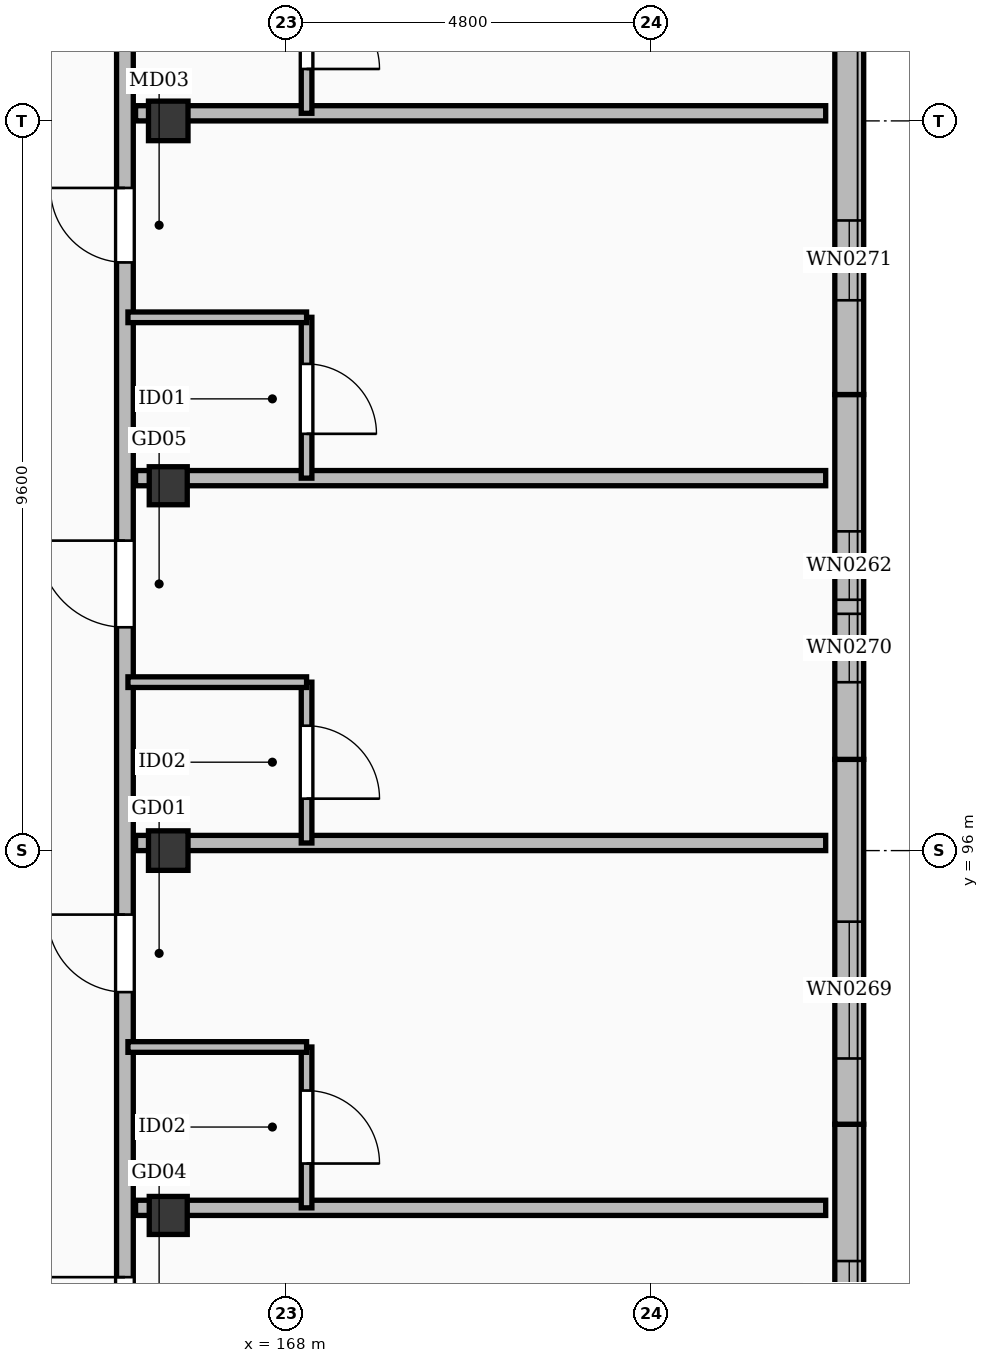
"""IFC4 building model, lengths in metres.
Left out: names, types, materials, properties, quantities, classifications, styles, units other than length and angle.
Written with IfcOpenShell. Run it as: python <this file> out.ifc"""

import sys

from ifc_helpers import new_model, si_unit, direction, frame, frame_2d, origin, origin_2d, place, context, subcontext, project, spatial, rectangle, extrude, element, fill, save


model = new_model("IFC4")
c1 = context("Model", 3, precision=1e-05, world=origin(), true_north=direction((0.0, 1.0)))
c2 = subcontext(c1, "Body", "Model", "MODEL_VIEW")
j1 = project(units=[si_unit("LENGTHUNIT", "METRE"), si_unit("PLANEANGLEUNIT", "RADIAN")], contexts=[c1])
p1 = place(None, origin())
s1 = spatial("IfcSite", under=j1, at=p1, CompositionType="ELEMENT")
p2 = place(p1, origin())
s2 = spatial("IfcBuilding", under=s1, at=p2, CompositionType="ELEMENT")
p3 = place(p2, frame((0.0, 0.0, 50.4)))
s3 = spatial("IfcBuildingStorey", under=s2, at=p3, CompositionType="ELEMENT", Elevation=50.4)
for number, where, z_axis, x_axis in (
    (1, (166.45, 96.0, 0.0), (0.0, 0.0, 1.0), (1.0, 0.0, 0.0)),
    (2, (166.45, 105.6, 0.0), (0.0, 0.0, 1.0), (1.0, 0.0, 0.0)),
):
    element("IfcColumn", number, at=place(p3, frame(where, z_axis=z_axis, x_axis=x_axis)), inside=s3, PredefinedType="COLUMN", context=c2, shape_type="SweptSolid", body=[
        extrude(rectangle(XDim=0.52, YDim=0.52, at=origin_2d()), origin(), (0.0, 0.0, 1.0), 4.2),
    ])
for number, where, z_axis, x_axis in (
    (3, (166.45, 91.2, 0.0), (0.0, 0.0, 1.0), (1.0, 0.0, 0.0)),
    (4, (166.45, 100.8, 0.0), (0.0, 0.0, 1.0), (1.0, 0.0, 0.0)),
):
    element("IfcColumn", number, at=place(p3, frame(where, z_axis=z_axis, x_axis=x_axis)), inside=s3, PredefinedType="COLUMN", context=c2, shape_type="SweptSolid", body=[
        extrude(rectangle(XDim=0.5, YDim=0.5, at=origin_2d()), origin(), (0.0, 0.0, 1.0), 4.2),
    ])
p4 = place(p3, frame((175.41, 92.4, 0.0), z_axis=(0.0, 0.0, 1.0), x_axis=(0.0, -1.0, 0.0)))
e5 = element("IfcWall", 5, at=p4, inside=s3, PredefinedType="SOLIDWALL", context=c2, shape_type="SweptSolid", body=[
    extrude(rectangle(XDim=4.8, YDim=0.38, at=frame_2d((2.4, 0.0))), origin(), (0.0, 0.0, 1.0), 3.96),
])
p5 = place(p4, frame((1.8, 0.0, 0.35)))
e6 = element("IfcOpeningElement", 6, at=p5, cuts=e5, PredefinedType="OPENING", context=c2, shape_type="SweptSolid", body=[
    extrude(rectangle(XDim=0.9, YDim=1.68, at=frame_2d((0.45, 0.84))), frame((0.0, 0.202, 0.0), z_axis=(0.0, -1.0, 0.0), x_axis=(1.0, 0.0, 0.0)), (0.0, 0.0, 1.0), 0.404),
])
p6 = place(p4, frame((3.135, 0.0, 0.55)))
e7 = element("IfcOpeningElement", 7, at=p6, cuts=e5, PredefinedType="OPENING", context=c2, shape_type="SweptSolid", body=[
    extrude(rectangle(XDim=1.2, YDim=1.72, at=frame_2d((0.6, 0.86))), frame((0.0, 0.202, 0.0), z_axis=(0.0, -1.0, 0.0), x_axis=(1.0, 0.0, 0.0)), (0.0, 0.0, 1.0), 0.404),
])
p7 = place(p3, frame((175.41, 97.2, 0.0), z_axis=(0.0, 0.0, 1.0), x_axis=(0.0, -1.0, 0.0)))
e8 = element("IfcWall", 8, at=p7, inside=s3, PredefinedType="SOLIDWALL", context=c2, shape_type="SweptSolid", body=[
    extrude(rectangle(XDim=4.8, YDim=0.38, at=frame_2d((2.4, 0.0))), origin(), (0.0, 0.0, 1.0), 3.96),
])
p8 = place(p7, frame((2.135, 0.0, 0.55)))
e9 = element("IfcOpeningElement", 9, at=p8, cuts=e8, PredefinedType="OPENING", context=c2, shape_type="SweptSolid", body=[
    extrude(rectangle(XDim=1.8, YDim=1.76, at=frame_2d((0.9, 0.88))), frame((0.0, 0.202, 0.0), z_axis=(0.0, -1.0, 0.0), x_axis=(1.0, 0.0, 0.0)), (0.0, 0.0, 1.0), 0.404),
])
p9 = place(p3, frame((175.41, 102.0, 0.0), z_axis=(0.0, 0.0, 1.0), x_axis=(0.0, -1.0, 0.0)))
e10 = element("IfcWall", 10, at=p9, inside=s3, PredefinedType="SOLIDWALL", context=c2, shape_type="SweptSolid", body=[
    extrude(rectangle(XDim=4.8, YDim=0.38, at=frame_2d((2.4, 0.0))), origin(), (0.0, 0.0, 1.0), 3.96),
])
p10 = place(p9, frame((1.8, 0.0, 0.35)))
e11 = element("IfcOpeningElement", 11, at=p10, cuts=e10, PredefinedType="OPENING", context=c2, shape_type="SweptSolid", body=[
    extrude(rectangle(XDim=0.9, YDim=1.68, at=frame_2d((0.45, 0.84))), frame((0.0, 0.202, 0.0), z_axis=(0.0, -1.0, 0.0), x_axis=(1.0, 0.0, 0.0)), (0.0, 0.0, 1.0), 0.404),
])
p11 = place(p9, frame((2.885, 0.0, 0.5)))
e12 = element("IfcOpeningElement", 12, at=p11, cuts=e10, PredefinedType="OPENING", context=c2, shape_type="SweptSolid", body=[
    extrude(rectangle(XDim=0.9, YDim=1.68, at=frame_2d((0.45, 0.84))), frame((0.0, 0.202, 0.0), z_axis=(0.0, -1.0, 0.0), x_axis=(1.0, 0.0, 0.0)), (0.0, 0.0, 1.0), 0.404),
])
p12 = place(p3, frame((175.41, 106.8, 0.0), z_axis=(0.0, 0.0, 1.0), x_axis=(0.0, -1.0, 0.0)))
e13 = element("IfcWall", 13, at=p12, inside=s3, PredefinedType="SOLIDWALL", context=c2, shape_type="SweptSolid", body=[
    extrude(rectangle(XDim=4.8, YDim=0.38, at=frame_2d((2.4, 0.0))), origin(), (0.0, 0.0, 1.0), 3.96),
])
p13 = place(p12, frame((2.51, 0.0, 0.55)))
e14 = element("IfcOpeningElement", 14, at=p13, cuts=e13, PredefinedType="OPENING", context=c2, shape_type="SweptSolid", body=[
    extrude(rectangle(XDim=1.05, YDim=1.65, at=frame_2d((0.525, 0.825))), frame((0.0, 0.202, 0.0), z_axis=(0.0, -1.0, 0.0), x_axis=(1.0, 0.0, 0.0)), (0.0, 0.0, 1.0), 0.404),
])
p14 = place(p3, frame((165.88, 73.55, 0.0), z_axis=(0.0, 0.0, 1.0), x_axis=(0.0, 1.0, 0.0)))
e15 = element("IfcWall", 15, at=p14, inside=s3, PredefinedType="PARTITIONING", context=c2, shape_type="SweptSolid", body=[
    extrude(rectangle(XDim=52.1, YDim=0.22, at=frame_2d((26.05, 0.0))), origin(), (0.0, 0.0, 1.0), 3.202),
])
p15 = place(p14, frame((5.9, 0.0, 0.0)))
e16 = element("IfcOpeningElement", 16, at=p15, cuts=e15, PredefinedType="OPENING", context=c2, shape_type="SweptSolid", body=[
    extrude(rectangle(XDim=1.12, YDim=2.15, at=frame_2d((0.56, 1.075))), frame((0.0, 0.122, 0.0), z_axis=(0.0, -1.0, 0.0), x_axis=(1.0, 0.0, 0.0)), (0.0, 0.0, 1.0), 0.244),
])
p16 = place(p14, frame((15.788, 0.0, 0.0)))
e17 = element("IfcOpeningElement", 17, at=p16, cuts=e15, PredefinedType="OPENING", context=c2, shape_type="SweptSolid", body=[
    extrude(rectangle(XDim=1.05, YDim=2.22, at=frame_2d((0.525, 1.11))), frame((0.0, 0.122, 0.0), z_axis=(0.0, -1.0, 0.0), x_axis=(1.0, 0.0, 0.0)), (0.0, 0.0, 1.0), 0.244),
])
p17 = place(p14, frame((20.588, 0.0, 0.0)))
e18 = element("IfcOpeningElement", 18, at=p17, cuts=e15, PredefinedType="OPENING", context=c2, shape_type="SweptSolid", body=[
    extrude(rectangle(XDim=1.02, YDim=2.2, at=frame_2d((0.51, 1.1))), frame((0.0, 0.122, 0.0), z_axis=(0.0, -1.0, 0.0), x_axis=(1.0, 0.0, 0.0)), (0.0, 0.0, 1.0), 0.244),
])
p18 = place(p14, frame((25.388, 0.0, 0.0)))
e19 = element("IfcOpeningElement", 19, at=p18, cuts=e15, PredefinedType="OPENING", context=c2, shape_type="SweptSolid", body=[
    extrude(rectangle(XDim=1.14, YDim=2.26, at=frame_2d((0.57, 1.13))), frame((0.0, 0.122, 0.0), z_axis=(0.0, -1.0, 0.0), x_axis=(1.0, 0.0, 0.0)), (0.0, 0.0, 1.0), 0.244),
])
p19 = place(p14, frame((30.188, 0.0, 0.0)))
e20 = element("IfcOpeningElement", 20, at=p19, cuts=e15, PredefinedType="OPENING", context=c2, shape_type="SweptSolid", body=[
    extrude(rectangle(XDim=0.98, YDim=2.15, at=frame_2d((0.49, 1.075))), frame((0.0, 0.122, 0.0), z_axis=(0.0, -1.0, 0.0), x_axis=(1.0, 0.0, 0.0)), (0.0, 0.0, 1.0), 0.244),
])
p20 = place(p14, frame((34.988, 0.0, 0.0)))
e21 = element("IfcOpeningElement", 21, at=p20, cuts=e15, PredefinedType="OPENING", context=c2, shape_type="SweptSolid", body=[
    extrude(rectangle(XDim=1.28, YDim=2.16, at=frame_2d((0.64, 1.08))), frame((0.0, 0.122, 0.0), z_axis=(0.0, -1.0, 0.0), x_axis=(1.0, 0.0, 0.0)), (0.0, 0.0, 1.0), 0.244),
])
p21 = place(p14, frame((39.788, 0.0, 0.0)))
e22 = element("IfcOpeningElement", 22, at=p21, cuts=e15, PredefinedType="OPENING", context=c2, shape_type="SweptSolid", body=[
    extrude(rectangle(XDim=0.9, YDim=2.08, at=frame_2d((0.45, 1.04))), frame((0.0, 0.122, 0.0), z_axis=(0.0, -1.0, 0.0), x_axis=(1.0, 0.0, 0.0)), (0.0, 0.0, 1.0), 0.244),
])
p22 = place(p14, frame((44.588, 0.0, 0.0)))
e23 = element("IfcOpeningElement", 23, at=p22, cuts=e15, PredefinedType="OPENING", context=c2, shape_type="SweptSolid", body=[
    extrude(rectangle(XDim=1.05, YDim=2.22, at=frame_2d((0.525, 1.11))), frame((0.0, 0.122, 0.0), z_axis=(0.0, -1.0, 0.0), x_axis=(1.0, 0.0, 0.0)), (0.0, 0.0, 1.0), 0.244),
])
p23 = place(p14, frame((49.388, 0.0, 0.0)))
e24 = element("IfcOpeningElement", 24, at=p23, cuts=e15, PredefinedType="OPENING", context=c2, shape_type="SweptSolid", body=[
    extrude(rectangle(XDim=1.02, YDim=2.2, at=frame_2d((0.51, 1.1))), frame((0.0, 0.122, 0.0), z_axis=(0.0, -1.0, 0.0), x_axis=(1.0, 0.0, 0.0)), (0.0, 0.0, 1.0), 0.244),
])
p24 = place(p3, frame((166.02, 91.3, 0.0), z_axis=(0.0, 0.0, 1.0), x_axis=(1.0, 0.0, 0.0)))
e25 = element("IfcWall", 25, at=p24, inside=s3, PredefinedType="PARTITIONING", context=c2, shape_type="SweptSolid", body=[
    extrude(rectangle(XDim=9.08, YDim=0.2, at=frame_2d((4.54, 0.0))), origin(), (0.0, 0.0, 1.0), 3.352),
])
p25 = place(p3, frame((168.27, 91.3, 0.0), z_axis=(0.0, 0.0, 1.0), x_axis=(0.0, 1.0, 0.0)))
e26 = element("IfcWall", 26, at=p25, inside=s3, PredefinedType="PARTITIONING", context=c2, shape_type="SweptSolid", body=[
    extrude(rectangle(XDim=2.116, YDim=0.14, at=frame_2d((1.058, 0.0))), origin(), (0.0, 0.0, 1.0), 3.96),
])
p26 = place(p25, frame((0.583, 0.0, 0.0)))
e27 = element("IfcOpeningElement", 27, at=p26, cuts=e26, PredefinedType="OPENING", context=c2, shape_type="SweptSolid", body=[
    extrude(rectangle(XDim=0.96, YDim=2.12, at=frame_2d((0.48, 1.06))), frame((0.0, 0.082, 0.0), z_axis=(0.0, -1.0, 0.0), x_axis=(1.0, 0.0, 0.0)), (0.0, 0.0, 1.0), 0.164),
])
p27 = place(p3, frame((165.92, 93.416, 0.0), z_axis=(0.0, 0.0, 1.0), x_axis=(1.0, 0.0, 0.0)))
e28 = element("IfcWall", 28, at=p27, inside=s3, PredefinedType="PARTITIONING", context=c2, shape_type="SweptSolid", body=[
    extrude(rectangle(XDim=2.35, YDim=0.14, at=frame_2d((1.175, 0.0))), origin(), (0.0, 0.0, 1.0), 3.352),
])
p28 = place(p3, frame((166.02, 96.1, 0.0), z_axis=(0.0, 0.0, 1.0), x_axis=(1.0, 0.0, 0.0)))
e29 = element("IfcWall", 29, at=p28, inside=s3, PredefinedType="PARTITIONING", context=c2, shape_type="SweptSolid", body=[
    extrude(rectangle(XDim=9.08, YDim=0.2, at=frame_2d((4.54, 0.0))), origin(), (0.0, 0.0, 1.0), 3.352),
])
p29 = place(p3, frame((168.27, 96.1, 0.0), z_axis=(0.0, 0.0, 1.0), x_axis=(0.0, 1.0, 0.0)))
e30 = element("IfcWall", 30, at=p29, inside=s3, PredefinedType="PARTITIONING", context=c2, shape_type="SweptSolid", body=[
    extrude(rectangle(XDim=2.116, YDim=0.14, at=frame_2d((1.058, 0.0))), origin(), (0.0, 0.0, 1.0), 3.96),
])
p30 = place(p29, frame((0.583, 0.0, 0.0)))
e31 = element("IfcOpeningElement", 31, at=p30, cuts=e30, PredefinedType="OPENING", context=c2, shape_type="SweptSolid", body=[
    extrude(rectangle(XDim=0.96, YDim=2.12, at=frame_2d((0.48, 1.06))), frame((0.0, 0.082, 0.0), z_axis=(0.0, -1.0, 0.0), x_axis=(1.0, 0.0, 0.0)), (0.0, 0.0, 1.0), 0.164),
])
p31 = place(p3, frame((165.92, 98.216, 0.0), z_axis=(0.0, 0.0, 1.0), x_axis=(1.0, 0.0, 0.0)))
e32 = element("IfcWall", 32, at=p31, inside=s3, PredefinedType="PARTITIONING", context=c2, shape_type="SweptSolid", body=[
    extrude(rectangle(XDim=2.35, YDim=0.14, at=frame_2d((1.175, 0.0))), origin(), (0.0, 0.0, 1.0), 3.352),
])
p32 = place(p3, frame((166.02, 100.9, 0.0), z_axis=(0.0, 0.0, 1.0), x_axis=(1.0, 0.0, 0.0)))
e33 = element("IfcWall", 33, at=p32, inside=s3, PredefinedType="PARTITIONING", context=c2, shape_type="SweptSolid", body=[
    extrude(rectangle(XDim=9.08, YDim=0.2, at=frame_2d((4.54, 0.0))), origin(), (0.0, 0.0, 1.0), 3.352),
])
p33 = place(p3, frame((168.27, 100.9, 0.0), z_axis=(0.0, 0.0, 1.0), x_axis=(0.0, 1.0, 0.0)))
e34 = element("IfcWall", 34, at=p33, inside=s3, PredefinedType="PARTITIONING", context=c2, shape_type="SweptSolid", body=[
    extrude(rectangle(XDim=2.116, YDim=0.14, at=frame_2d((1.058, 0.0))), origin(), (0.0, 0.0, 1.0), 3.96),
])
p34 = place(p33, frame((0.583, 0.0, 0.0)))
e35 = element("IfcOpeningElement", 35, at=p34, cuts=e34, PredefinedType="OPENING", context=c2, shape_type="SweptSolid", body=[
    extrude(rectangle(XDim=0.92, YDim=2.1, at=frame_2d((0.46, 1.05))), frame((0.0, 0.082, 0.0), z_axis=(0.0, -1.0, 0.0), x_axis=(1.0, 0.0, 0.0)), (0.0, 0.0, 1.0), 0.164),
])
p35 = place(p3, frame((165.92, 103.016, 0.0), z_axis=(0.0, 0.0, 1.0), x_axis=(1.0, 0.0, 0.0)))
e36 = element("IfcWall", 36, at=p35, inside=s3, PredefinedType="PARTITIONING", context=c2, shape_type="SweptSolid", body=[
    extrude(rectangle(XDim=2.35, YDim=0.14, at=frame_2d((1.175, 0.0))), origin(), (0.0, 0.0, 1.0), 3.352),
])
p36 = place(p3, frame((166.02, 105.7, 0.0), z_axis=(0.0, 0.0, 1.0), x_axis=(1.0, 0.0, 0.0)))
e37 = element("IfcWall", 37, at=p36, inside=s3, PredefinedType="PARTITIONING", context=c2, shape_type="SweptSolid", body=[
    extrude(rectangle(XDim=9.08, YDim=0.2, at=frame_2d((4.54, 0.0))), origin(), (0.0, 0.0, 1.0), 3.352),
])
p37 = place(p3, frame((168.27, 105.7, 0.0), z_axis=(0.0, 0.0, 1.0), x_axis=(0.0, 1.0, 0.0)))
e38 = element("IfcWall", 38, at=p37, inside=s3, PredefinedType="PARTITIONING", context=c2, shape_type="SweptSolid", body=[
    extrude(rectangle(XDim=2.116, YDim=0.14, at=frame_2d((1.058, 0.0))), origin(), (0.0, 0.0, 1.0), 3.96),
])
p38 = place(p37, frame((0.583, 0.0, 0.0)))
e39 = element("IfcOpeningElement", 39, at=p38, cuts=e38, PredefinedType="OPENING", context=c2, shape_type="SweptSolid", body=[
    extrude(rectangle(XDim=0.96, YDim=2.12, at=frame_2d((0.48, 1.06))), frame((0.0, 0.082, 0.0), z_axis=(0.0, -1.0, 0.0), x_axis=(1.0, 0.0, 0.0)), (0.0, 0.0, 1.0), 0.164),
])
p39 = place(p5, origin())
e40 = element("IfcWindow", 40, at=p39, inside=s3, PartitioningType="SINGLE_PANEL", PredefinedType="WINDOW", context=c2, shape_type="SweptSolid", body=[
    extrude(rectangle(XDim=0.9, YDim=1.68, at=frame_2d((0.45, 0.84))), frame((0.0, 0.03, 0.0), z_axis=(0.0, -1.0, 0.0), x_axis=(1.0, 0.0, 0.0)), (0.0, 0.0, 1.0), 0.06),
])
fill(e6, e40)
p40 = place(p10, origin())
e41 = element("IfcWindow", 41, at=p40, inside=s3, PartitioningType="SINGLE_PANEL", PredefinedType="WINDOW", context=c2, shape_type="SweptSolid", body=[
    extrude(rectangle(XDim=0.9, YDim=1.68, at=frame_2d((0.45, 0.84))), frame((0.0, 0.03, 0.0), z_axis=(0.0, -1.0, 0.0), x_axis=(1.0, 0.0, 0.0)), (0.0, 0.0, 1.0), 0.06),
])
fill(e11, e41)
p41 = place(p8, origin())
e42 = element("IfcWindow", 42, at=p41, inside=s3, PartitioningType="SINGLE_PANEL", PredefinedType="WINDOW", context=c2, shape_type="SweptSolid", body=[
    extrude(rectangle(XDim=1.8, YDim=1.76, at=frame_2d((0.9, 0.88))), frame((0.0, 0.03, 0.0), z_axis=(0.0, -1.0, 0.0), x_axis=(1.0, 0.0, 0.0)), (0.0, 0.0, 1.0), 0.06),
])
fill(e9, e42)
p42 = place(p11, origin())
e43 = element("IfcWindow", 43, at=p42, inside=s3, PartitioningType="SINGLE_PANEL", PredefinedType="WINDOW", context=c2, shape_type="SweptSolid", body=[
    extrude(rectangle(XDim=0.9, YDim=1.68, at=frame_2d((0.45, 0.84))), frame((0.0, 0.03, 0.0), z_axis=(0.0, -1.0, 0.0), x_axis=(1.0, 0.0, 0.0)), (0.0, 0.0, 1.0), 0.06),
])
fill(e12, e43)
p43 = place(p13, origin())
e44 = element("IfcWindow", 44, at=p43, inside=s3, PartitioningType="SINGLE_PANEL", PredefinedType="WINDOW", context=c2, shape_type="SweptSolid", body=[
    extrude(rectangle(XDim=1.05, YDim=1.65, at=frame_2d((0.525, 0.825))), frame((0.0, 0.03, 0.0), z_axis=(0.0, -1.0, 0.0), x_axis=(1.0, 0.0, 0.0)), (0.0, 0.0, 1.0), 0.06),
])
fill(e14, e44)
p44 = place(p16, origin())
e45 = element("IfcDoor", 45, at=p44, inside=s3, OperationType="SINGLE_SWING_RIGHT", PredefinedType="DOOR", context=c2, shape_type="SweptSolid", body=[
    extrude(rectangle(XDim=1.05, YDim=2.22, at=frame_2d((0.525, 1.11))), frame((0.0, 0.025, 0.0), z_axis=(0.0, -1.0, 0.0), x_axis=(1.0, 0.0, 0.0)), (0.0, 0.0, 1.0), 0.05),
])
fill(e17, e45)
p45 = place(p17, origin())
e46 = element("IfcDoor", 46, at=p45, inside=s3, OperationType="SINGLE_SWING_RIGHT", PredefinedType="DOOR", context=c2, shape_type="SweptSolid", body=[
    extrude(rectangle(XDim=1.02, YDim=2.2, at=frame_2d((0.51, 1.1))), frame((0.0, 0.025, 0.0), z_axis=(0.0, -1.0, 0.0), x_axis=(1.0, 0.0, 0.0)), (0.0, 0.0, 1.0), 0.05),
])
fill(e18, e46)
p46 = place(p26, frame((0.96, 0.0, 0.0), z_axis=(0.0, 0.0, 1.0), x_axis=(-1.0, 0.0, 0.0)))
e47 = element("IfcDoor", 47, at=p46, inside=s3, OperationType="SINGLE_SWING_LEFT", PredefinedType="DOOR", context=c2, shape_type="SweptSolid", body=[
    extrude(rectangle(XDim=0.96, YDim=2.12, at=frame_2d((0.48, 1.06))), frame((0.0, 0.025, 0.0), z_axis=(0.0, -1.0, 0.0), x_axis=(1.0, 0.0, 0.0)), (0.0, 0.0, 1.0), 0.05),
])
fill(e27, e47)
p47 = place(p18, origin())
e48 = element("IfcDoor", 48, at=p47, inside=s3, OperationType="SINGLE_SWING_RIGHT", PredefinedType="DOOR", context=c2, shape_type="SweptSolid", body=[
    extrude(rectangle(XDim=1.14, YDim=2.26, at=frame_2d((0.57, 1.13))), frame((0.0, 0.025, 0.0), z_axis=(0.0, -1.0, 0.0), x_axis=(1.0, 0.0, 0.0)), (0.0, 0.0, 1.0), 0.05),
])
fill(e19, e48)
p48 = place(p30, frame((0.96, 0.0, 0.0), z_axis=(0.0, 0.0, 1.0), x_axis=(-1.0, 0.0, 0.0)))
e49 = element("IfcDoor", 49, at=p48, inside=s3, OperationType="SINGLE_SWING_LEFT", PredefinedType="DOOR", context=c2, shape_type="SweptSolid", body=[
    extrude(rectangle(XDim=0.96, YDim=2.12, at=frame_2d((0.48, 1.06))), frame((0.0, 0.025, 0.0), z_axis=(0.0, -1.0, 0.0), x_axis=(1.0, 0.0, 0.0)), (0.0, 0.0, 1.0), 0.05),
])
fill(e31, e49)
p49 = place(p19, origin())
e50 = element("IfcDoor", 50, at=p49, inside=s3, OperationType="SINGLE_SWING_RIGHT", PredefinedType="DOOR", context=c2, shape_type="SweptSolid", body=[
    extrude(rectangle(XDim=0.98, YDim=2.15, at=frame_2d((0.49, 1.075))), frame((0.0, 0.025, 0.0), z_axis=(0.0, -1.0, 0.0), x_axis=(1.0, 0.0, 0.0)), (0.0, 0.0, 1.0), 0.05),
])
fill(e20, e50)
p50 = place(p34, frame((0.92, 0.0, 0.0), z_axis=(0.0, 0.0, 1.0), x_axis=(-1.0, 0.0, 0.0)))
e51 = element("IfcDoor", 51, at=p50, inside=s3, OperationType="SINGLE_SWING_LEFT", PredefinedType="DOOR", context=c2, shape_type="SweptSolid", body=[
    extrude(rectangle(XDim=0.92, YDim=2.1, at=frame_2d((0.46, 1.05))), frame((0.0, 0.025, 0.0), z_axis=(0.0, -1.0, 0.0), x_axis=(1.0, 0.0, 0.0)), (0.0, 0.0, 1.0), 0.05),
])
fill(e35, e51)
p51 = place(p38, frame((0.96, 0.0, 0.0), z_axis=(0.0, 0.0, 1.0), x_axis=(-1.0, 0.0, 0.0)))
e52 = element("IfcDoor", 52, at=p51, inside=s3, OperationType="SINGLE_SWING_LEFT", PredefinedType="DOOR", context=c2, shape_type="SweptSolid", body=[
    extrude(rectangle(XDim=0.96, YDim=2.12, at=frame_2d((0.48, 1.06))), frame((0.0, 0.025, 0.0), z_axis=(0.0, -1.0, 0.0), x_axis=(1.0, 0.0, 0.0)), (0.0, 0.0, 1.0), 0.05),
])
fill(e39, e52)
save(model, sys.argv[1])
